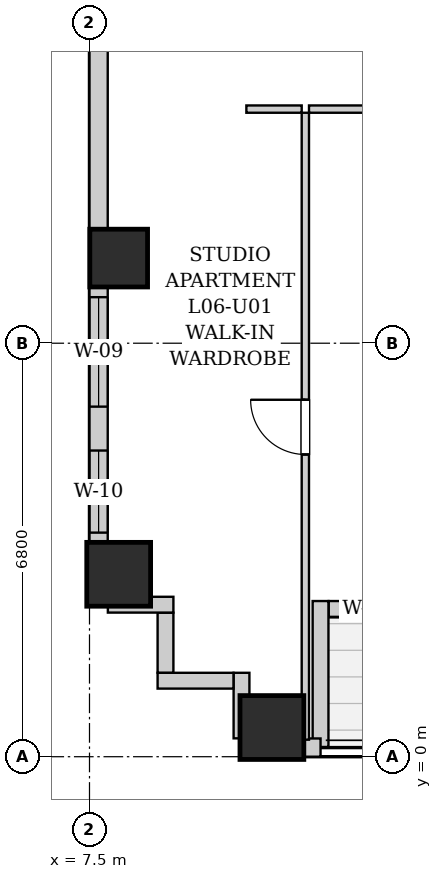
"""IFC4 building model, lengths in metres.
Left out: names, types, materials, properties, quantities, classifications, styles, units other than length and angle.
Written with IfcOpenShell. Run it as: python <this file> out.ifc"""

import sys

from ifc_helpers import new_model, si_unit, direction, frame, frame_2d, origin, origin_2d, place, context, subcontext, project, spatial, rectangle, extrude, element, fill, save


model = new_model("IFC4")
c1 = context("Model", 3, precision=1e-05, world=origin(), true_north=direction((0.0, 1.0)))
c2 = subcontext(c1, "Body", "Model", "MODEL_VIEW")
j1 = project(units=[si_unit("LENGTHUNIT", "METRE"), si_unit("PLANEANGLEUNIT", "RADIAN")], contexts=[c1])
p1 = place(None, origin())
s1 = spatial("IfcSite", under=j1, at=p1, CompositionType="ELEMENT")
p2 = place(p1, origin())
s2 = spatial("IfcBuilding", under=s1, at=p2, CompositionType="ELEMENT")
p3 = place(p2, frame((0.0, 0.0, 29.0)))
s3 = spatial("IfcBuildingStorey", under=s2, at=p3, CompositionType="ELEMENT", Elevation=29.0)
for number, where, z_axis, x_axis in (
    (1, (10.5, 0.48, 0.0), (0.0, 0.0, 1.0), (1.0, 0.0, 0.0)),
    (2, (7.98, 3.0, 0.0), (0.0, 0.0, 1.0), (1.0, 0.0, 0.0)),
):
    element("IfcColumn", number, at=place(p3, frame(where, z_axis=z_axis, x_axis=x_axis)), inside=s3, PredefinedType="COLUMN", context=c2, shape_type="SweptSolid", body=[
        extrude(rectangle(XDim=1.05, YDim=1.05, at=origin_2d()), origin(), (0.0, 0.0, 1.0), 3.2),
    ])
p4 = place(p3, frame((7.98, 8.2, 0.0), z_axis=(0.0, 0.0, 1.0), x_axis=(1.0, 0.0, 0.0)))
e3 = element("IfcColumn", 3, at=p4, inside=s3, PredefinedType="COLUMN", context=c2, shape_type="SweptSolid", body=[
    extrude(rectangle(XDim=0.95, YDim=0.95, at=origin_2d()), origin(), (0.0, 0.0, 1.0), 3.2),
])
p5 = place(p3, frame((15.766, 2.43, 0.0), z_axis=(0.0, 0.0, 1.0), x_axis=(-1.0, 0.0, 0.0)))
e4 = element("IfcWall", 4, at=p5, inside=s3, PredefinedType="SOLIDWALL", context=c2, shape_type="SweptSolid", body=[
    extrude(rectangle(XDim=4.332, YDim=0.26, at=frame_2d((2.166, 0.0))), origin(), (0.0, 0.0, 1.0), 2.94),
])
p6 = place(p5, frame((1.636, 0.0, 0.0)))
e5 = element("IfcOpeningElement", 5, at=p6, cuts=e4, PredefinedType="OPENING", context=c2, shape_type="SweptSolid", body=[
    extrude(rectangle(XDim=1.1, YDim=2.0, at=frame_2d((0.55, 1.0))), frame((0.0, 0.14, 0.0), z_axis=(0.0, -1.0, 0.0), x_axis=(1.0, 0.0, 0.0)), (0.0, 0.0, 1.0), 0.28),
])
p7 = place(p5, frame((2.896, 0.0, 0.55)))
e6 = element("IfcOpeningElement", 6, at=p7, cuts=e4, PredefinedType="OPENING", context=c2, shape_type="SweptSolid", body=[
    extrude(rectangle(XDim=0.85, YDim=1.2, at=frame_2d((0.425, 0.6))), frame((0.0, 0.14, 0.0), z_axis=(0.0, -1.0, 0.0), x_axis=(1.0, 0.0, 0.0)), (0.0, 0.0, 1.0), 0.28),
])
p8 = place(p3, frame((11.3, 2.56, 0.0), z_axis=(0.0, 0.0, 1.0), x_axis=(0.0, -1.0, 0.0)))
e7 = element("IfcWall", 7, at=p8, inside=s3, PredefinedType="SOLIDWALL", context=c2, shape_type="SweptSolid", body=[
    extrude(rectangle(XDim=2.4, YDim=0.26, at=frame_2d((1.2, 0.0))), origin(), (0.0, 0.0, 1.0), 2.94),
])
p9 = place(p3, frame((11.3, 0.15, 0.0), z_axis=(0.0, 0.0, 1.0), x_axis=(-1.0, 0.0, 0.0)))
e8 = element("IfcWall", 8, at=p9, inside=s3, PredefinedType="SOLIDWALL", context=c2, shape_type="SweptSolid", body=[
    extrude(rectangle(XDim=1.3, YDim=0.3, at=frame_2d((0.65, 0.0))), origin(), (0.0, 0.0, 1.0), 1.975),
])
p10 = place(p3, frame((7.65, 2.5, 0.0), z_axis=(0.0, 0.0, 1.0), x_axis=(0.0, 1.0, 0.0)))
e9 = element("IfcWall", 9, at=p10, inside=s3, PredefinedType="SOLIDWALL", context=c2, shape_type="SweptSolid", body=[
    extrude(rectangle(XDim=12.7, YDim=0.3, at=frame_2d((6.35, 0.0))), origin(), (0.0, 0.0, 1.0), 1.975),
])
p11 = place(p10, frame((3.257, 0.0, 0.55)))
e10 = element("IfcOpeningElement", 10, at=p11, cuts=e9, PredefinedType="OPENING", context=c2, shape_type="SweptSolid", body=[
    extrude(rectangle(XDim=1.8, YDim=1.2, at=frame_2d((0.9, 0.6))), frame((0.0, 0.16, 0.0), z_axis=(0.0, -1.0, 0.0), x_axis=(1.0, 0.0, 0.0)), (0.0, 0.0, 1.0), 0.32),
])
p12 = place(p10, frame((1.185, 0.0, 0.55)))
e11 = element("IfcOpeningElement", 11, at=p12, cuts=e9, PredefinedType="OPENING", context=c2, shape_type="SweptSolid", body=[
    extrude(rectangle(XDim=1.35, YDim=1.2, at=frame_2d((0.675, 0.6))), frame((0.0, 0.16, 0.0), z_axis=(0.0, -1.0, 0.0), x_axis=(1.0, 0.0, 0.0)), (0.0, 0.0, 1.0), 0.32),
])
p13 = place(p3, frame((10.0, 0.302, 0.0), z_axis=(0.0, 0.0, 1.0), x_axis=(0.0, 1.0, 0.0)))
e12 = element("IfcWall", 12, at=p13, inside=s3, PredefinedType="SOLIDWALL", context=c2, shape_type="SweptSolid", body=[
    extrude(rectangle(XDim=1.078, YDim=0.26, at=frame_2d((0.539, 0.0))), origin(), (0.0, 0.0, 1.0), 2.94),
])
p14 = place(p3, frame((9.868, 1.25, 0.0), z_axis=(0.0, 0.0, 1.0), x_axis=(-1.0, 0.0, 0.0)))
e13 = element("IfcWall", 13, at=p14, inside=s3, PredefinedType="SOLIDWALL", context=c2, shape_type="SweptSolid", body=[
    extrude(rectangle(XDim=1.248, YDim=0.26, at=frame_2d((0.624, 0.0))), origin(), (0.0, 0.0, 1.0), 2.94),
])
p15 = place(p3, frame((8.75, 1.382, 0.0), z_axis=(0.0, 0.0, 1.0), x_axis=(0.0, 1.0, 0.0)))
e14 = element("IfcWall", 14, at=p15, inside=s3, PredefinedType="SOLIDWALL", context=c2, shape_type="SweptSolid", body=[
    extrude(rectangle(XDim=0.986, YDim=0.26, at=frame_2d((0.493, 0.0))), origin(), (0.0, 0.0, 1.0), 2.94),
])
p16 = place(p3, frame((8.88, 2.5, 0.0), z_axis=(0.0, 0.0, 1.0), x_axis=(-1.0, 0.0, 0.0)))
e15 = element("IfcWall", 15, at=p16, inside=s3, PredefinedType="SOLIDWALL", context=c2, shape_type="SweptSolid", body=[
    extrude(rectangle(XDim=1.078, YDim=0.26, at=frame_2d((0.539, 0.0))), origin(), (0.0, 0.0, 1.0), 2.94),
])
p17 = place(p3, frame((10.08, 10.65, 0.0), z_axis=(0.0, 0.0, 1.0), x_axis=(1.0, 0.0, 0.0)))
e16 = element("IfcWall", 16, at=p17, inside=s3, PredefinedType="PARTITIONING", context=c2, shape_type="SweptSolid", body=[
    extrude(rectangle(XDim=0.91, YDim=0.12, at=frame_2d((0.455, 0.0))), origin(), (0.0, 0.0, 1.0), 2.94),
])
p18 = place(p3, frame((11.11, 10.65, 0.0), z_axis=(0.0, 0.0, 1.0), x_axis=(1.0, 0.0, 0.0)))
e17 = element("IfcWall", 17, at=p18, inside=s3, PredefinedType="PARTITIONING", context=c2, shape_type="SweptSolid", body=[
    extrude(rectangle(XDim=1.37, YDim=0.12, at=frame_2d((0.685, 0.0))), origin(), (0.0, 0.0, 1.0), 2.94),
])
p19 = place(p3, frame((11.05, 0.28, 0.0), z_axis=(0.0, 0.0, 1.0), x_axis=(0.0, 1.0, 0.0)))
e18 = element("IfcWall", 18, at=p19, inside=s3, PredefinedType="PARTITIONING", context=c2, shape_type="SweptSolid", body=[
    extrude(rectangle(XDim=10.31, YDim=0.12, at=frame_2d((5.155, 0.0))), origin(), (0.0, 0.0, 1.0), 2.94),
])
p20 = place(p19, frame((4.69, 0.0, 0.0)))
e19 = element("IfcOpeningElement", 19, at=p20, cuts=e18, PredefinedType="OPENING", context=c2, shape_type="SweptSolid", body=[
    extrude(rectangle(XDim=0.9, YDim=2.05, at=frame_2d((0.45, 1.025))), frame((0.0, 0.07, 0.0), z_axis=(0.0, -1.0, 0.0), x_axis=(1.0, 0.0, 0.0)), (0.0, 0.0, 1.0), 0.14),
])
p21 = place(p20, origin())
e20 = element("IfcDoor", 20, at=p21, inside=s3, OperationType="SINGLE_SWING_RIGHT", PredefinedType="DOOR", context=c2, shape_type="SweptSolid", body=[
    extrude(rectangle(XDim=0.9, YDim=2.05, at=frame_2d((0.45, 1.025))), frame((0.0, 0.025, 0.0), z_axis=(0.0, -1.0, 0.0), x_axis=(1.0, 0.0, 0.0)), (0.0, 0.0, 1.0), 0.05),
])
fill(e19, e20)
p22 = place(p11, origin())
e21 = element("IfcWindow", 21, at=p22, inside=s3, PartitioningType="DOUBLE_PANEL_VERTICAL", PredefinedType="WINDOW", context=c2, shape_type="SweptSolid", body=[
    extrude(rectangle(XDim=1.8, YDim=1.2, at=frame_2d((0.9, 0.6))), frame((0.0, 0.03, 0.0), z_axis=(0.0, -1.0, 0.0), x_axis=(1.0, 0.0, 0.0)), (0.0, 0.0, 1.0), 0.06),
])
fill(e10, e21)
p23 = place(p12, origin())
e22 = element("IfcWindow", 22, at=p23, inside=s3, PartitioningType="SINGLE_PANEL", PredefinedType="WINDOW", context=c2, shape_type="SweptSolid", body=[
    extrude(rectangle(XDim=1.35, YDim=1.2, at=frame_2d((0.675, 0.6))), frame((0.0, 0.03, 0.0), z_axis=(0.0, -1.0, 0.0), x_axis=(1.0, 0.0, 0.0)), (0.0, 0.0, 1.0), 0.06),
])
fill(e11, e22)
save(model, sys.argv[1])
